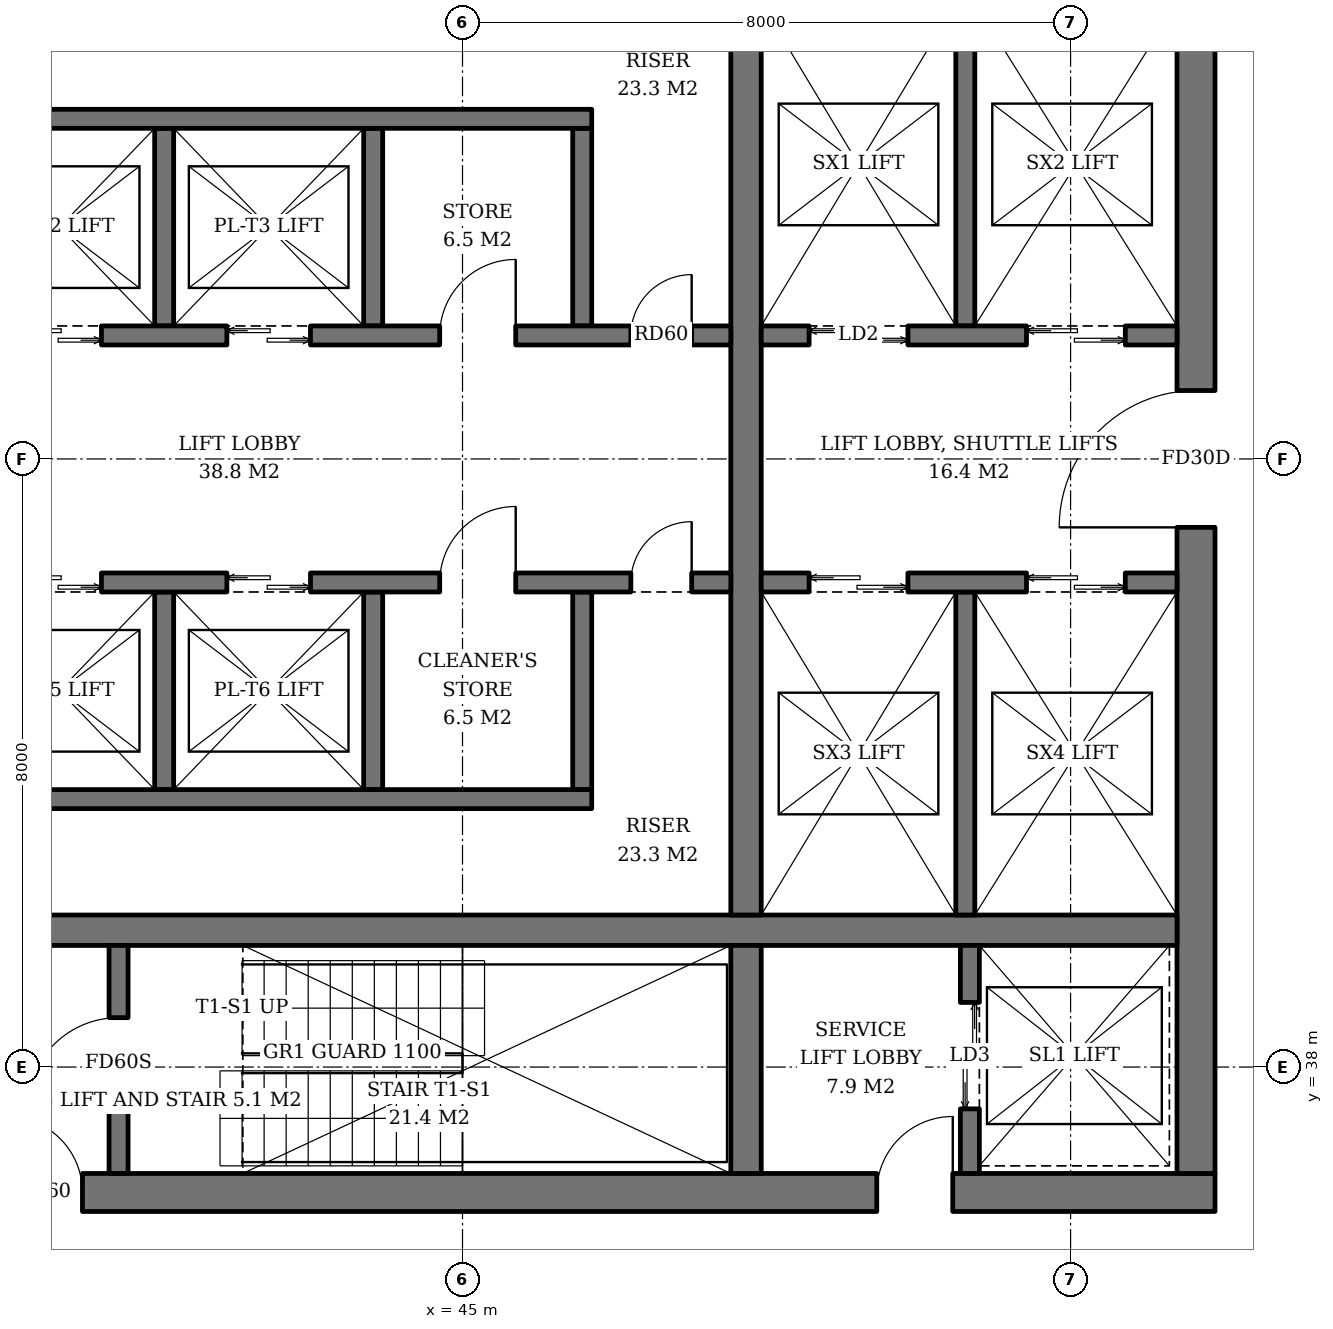
"""IFC4 building model, lengths in metres.
Left out: names, types, materials, properties, quantities, classifications, styles, units other than length and angle.
Written with IfcOpenShell. Run it as: python <this file> out.ifc"""

import sys

from ifc_helpers import new_model, si_unit, direction, frame, frame_2d, origin, place, context, subcontext, project, spatial, rectangle, extrude, element, fill, save


model = new_model("IFC4")
c1 = context("Model", 3, precision=1e-05, world=origin(), true_north=direction((0.0, 1.0)))
c2 = subcontext(c1, "Body", "Model", "MODEL_VIEW")
j1 = project(units=[si_unit("LENGTHUNIT", "METRE"), si_unit("PLANEANGLEUNIT", "RADIAN")], contexts=[c1])
p1 = place(None, origin())
s1 = spatial("IfcSite", under=j1, at=p1, CompositionType="ELEMENT")
p2 = place(p1, origin())
s2 = spatial("IfcBuilding", under=s1, at=p2, CompositionType="ELEMENT")
p3 = place(p2, frame((0.0, 0.0, 237.6)))
s3 = spatial("IfcBuildingStorey", under=s2, at=p3, CompositionType="ELEMENT", Elevation=237.6)
p4 = place(p3, frame((35.1, 36.35, 0.0), z_axis=(0.0, 0.0, 1.0), x_axis=(1.0, 0.0, 0.0)))
e1 = element("IfcWall", 1, at=p4, inside=s3, PredefinedType="SHEAR", context=c2, shape_type="SweptSolid", body=[
    extrude(rectangle(XDim=19.8, YDim=0.5, at=frame_2d((9.9, 0.0))), origin(), (0.0, 0.0, 1.0), 3.8),
])
p5 = place(p4, frame((3.9, 0.0, 0.0)))
e2 = element("IfcOpeningElement", 2, at=p5, cuts=e1, PredefinedType="OPENING", context=c2, shape_type="SweptSolid", body=[
    extrude(rectangle(XDim=1.0, YDim=2.1, at=frame_2d((0.5, 1.05))), frame((0.0, 0.26, 0.0), z_axis=(0.0, -1.0, 0.0), x_axis=(1.0, 0.0, 0.0)), (0.0, 0.0, 1.0), 0.52),
])
p6 = place(p4, frame((15.35, 0.0, 0.0)))
e3 = element("IfcOpeningElement", 3, at=p6, cuts=e1, PredefinedType="OPENING", context=c2, shape_type="SweptSolid", body=[
    extrude(rectangle(XDim=1.0, YDim=2.1, at=frame_2d((0.5, 1.05))), frame((0.0, 0.26, 0.0), z_axis=(0.0, -1.0, 0.0), x_axis=(1.0, 0.0, 0.0)), (0.0, 0.0, 1.0), 0.52),
])
p7 = place(p3, frame((54.65, 36.6, 0.0), z_axis=(0.0, 0.0, 1.0), x_axis=(0.0, 1.0, 0.0)))
e4 = element("IfcWall", 4, at=p7, inside=s3, PredefinedType="SHEAR", context=c2, shape_type="SweptSolid", body=[
    extrude(rectangle(XDim=18.8, YDim=0.5, at=frame_2d((9.4, 0.0))), origin(), (0.0, 0.0, 1.0), 3.8),
])
p8 = place(p7, frame((8.5, 0.0, 0.0)))
e5 = element("IfcOpeningElement", 5, at=p8, cuts=e4, PredefinedType="OPENING", context=c2, shape_type="SweptSolid", body=[
    extrude(rectangle(XDim=1.8, YDim=2.4, at=frame_2d((0.9, 1.2))), frame((0.0, 0.26, 0.0), z_axis=(0.0, -1.0, 0.0), x_axis=(1.0, 0.0, 0.0)), (0.0, 0.0, 1.0), 0.52),
])
p9 = place(p3, frame((35.6, 39.8, 0.0), z_axis=(0.0, 0.0, 1.0), x_axis=(1.0, 0.0, 0.0)))
e6 = element("IfcWall", 6, at=p9, inside=s3, PredefinedType="SHEAR", context=c2, shape_type="SweptSolid", body=[
    extrude(rectangle(XDim=18.8, YDim=0.4, at=frame_2d((9.4, 0.0))), origin(), (0.0, 0.0, 1.0), 3.8),
])
p10 = place(p3, frame((48.73, 36.6, 0.0), z_axis=(0.0, 0.0, 1.0), x_axis=(0.0, 1.0, 0.0)))
e7 = element("IfcWall", 7, at=p10, inside=s3, PredefinedType="SHEAR", context=c2, shape_type="SweptSolid", body=[
    extrude(rectangle(XDim=3.0, YDim=0.4, at=frame_2d((1.5, 0.0))), origin(), (0.0, 0.0, 1.0), 3.8),
])
p11 = place(p3, frame((48.73, 40.0, 0.0), z_axis=(0.0, 0.0, 1.0), x_axis=(0.0, 1.0, 0.0)))
e8 = element("IfcWall", 8, at=p11, inside=s3, PredefinedType="SHEAR", context=c2, shape_type="SweptSolid", body=[
    extrude(rectangle(XDim=12.0, YDim=0.4, at=frame_2d((6.0, 0.0))), origin(), (0.0, 0.0, 1.0), 3.8),
])
p12 = place(p3, frame((40.475, 36.6, 0.0), z_axis=(0.0, 0.0, 1.0), x_axis=(0.0, 1.0, 0.0)))
e9 = element("IfcWall", 9, at=p12, inside=s3, PredefinedType="SHEAR", context=c2, shape_type="SweptSolid", body=[
    extrude(rectangle(XDim=3.0, YDim=0.25, at=frame_2d((1.5, 0.0))), origin(), (0.0, 0.0, 1.0), 3.8),
])
p13 = place(p12, frame((0.85, 0.0, 0.0)))
e10 = element("IfcOpeningElement", 10, at=p13, cuts=e9, PredefinedType="OPENING", context=c2, shape_type="SweptSolid", body=[
    extrude(rectangle(XDim=1.2, YDim=2.1, at=frame_2d((0.6, 1.05))), frame((0.0, 0.135, 0.0), z_axis=(0.0, -1.0, 0.0), x_axis=(1.0, 0.0, 0.0)), (0.0, 0.0, 1.0), 0.27),
])
p14 = place(p3, frame((51.675, 36.6, 0.0), z_axis=(0.0, 0.0, 1.0), x_axis=(0.0, 1.0, 0.0)))
e11 = element("IfcWall", 11, at=p14, inside=s3, PredefinedType="SHEAR", context=c2, shape_type="SweptSolid", body=[
    extrude(rectangle(XDim=3.0, YDim=0.25, at=frame_2d((1.5, 0.0))), origin(), (0.0, 0.0, 1.0), 3.8),
])
p15 = place(p14, frame((0.85, 0.0, 0.0)))
e12 = element("IfcOpeningElement", 12, at=p15, cuts=e11, PredefinedType="OPENING", context=c2, shape_type="SweptSolid", body=[
    extrude(rectangle(XDim=1.4, YDim=2.4, at=frame_2d((0.7, 1.2))), frame((0.0, 0.135, 0.0), z_axis=(0.0, -1.0, 0.0), x_axis=(1.0, 0.0, 0.0)), (0.0, 0.0, 1.0), 0.27),
])
for number, where, z_axis, x_axis in (
    (13, (41.075, 47.75, 0.0), (0.0, 0.0, 1.0), (0.0, 1.0, 0.0)),
    (14, (43.825, 47.75, 0.0), (0.0, 0.0, 1.0), (0.0, 1.0, 0.0)),
    (15, (46.575, 47.75, 0.0), (0.0, 0.0, 1.0), (0.0, 1.0, 0.0)),
):
    element("IfcWall", number, at=place(p3, frame(where, z_axis=z_axis, x_axis=x_axis)), inside=s3, PredefinedType="SHEAR", context=c2, shape_type="SweptSolid", body=[
        extrude(rectangle(XDim=2.6, YDim=0.25, at=frame_2d((1.3, 0.0))), origin(), (0.0, 0.0, 1.0), 3.8),
    ])
p16 = place(p3, frame((35.6, 50.475, 0.0), z_axis=(0.0, 0.0, 1.0), x_axis=(1.0, 0.0, 0.0)))
e16 = element("IfcWall", 16, at=p16, inside=s3, PredefinedType="SHEAR", context=c2, shape_type="SweptSolid", body=[
    extrude(rectangle(XDim=11.1, YDim=0.25, at=frame_2d((5.55, 0.0))), origin(), (0.0, 0.0, 1.0), 3.8),
])
p17 = place(p3, frame((35.6, 47.625, 0.0), z_axis=(0.0, 0.0, 1.0), x_axis=(1.0, 0.0, 0.0)))
e17 = element("IfcWall", 17, at=p17, inside=s3, PredefinedType="SHEAR", context=c2, shape_type="SweptSolid", body=[
    extrude(rectangle(XDim=12.93, YDim=0.25, at=frame_2d((6.465, 0.0))), origin(), (0.0, 0.0, 1.0), 3.8),
])
p18 = place(p17, frame((0.75, 0.0, 0.0)))
e18 = element("IfcOpeningElement", 18, at=p18, cuts=e17, PredefinedType="OPENING", context=c2, shape_type="SweptSolid", body=[
    extrude(rectangle(XDim=1.1, YDim=2.2, at=frame_2d((0.55, 1.1))), frame((0.0, 0.135, 0.0), z_axis=(0.0, -1.0, 0.0), x_axis=(1.0, 0.0, 0.0)), (0.0, 0.0, 1.0), 0.27),
])
p19 = place(p17, frame((3.55, 0.0, 0.0)))
e19 = element("IfcOpeningElement", 19, at=p19, cuts=e17, PredefinedType="OPENING", context=c2, shape_type="SweptSolid", body=[
    extrude(rectangle(XDim=1.1, YDim=2.2, at=frame_2d((0.55, 1.1))), frame((0.0, 0.135, 0.0), z_axis=(0.0, -1.0, 0.0), x_axis=(1.0, 0.0, 0.0)), (0.0, 0.0, 1.0), 0.27),
])
p20 = place(p17, frame((6.3, 0.0, 0.0)))
e20 = element("IfcOpeningElement", 20, at=p20, cuts=e17, PredefinedType="OPENING", context=c2, shape_type="SweptSolid", body=[
    extrude(rectangle(XDim=1.1, YDim=2.2, at=frame_2d((0.55, 1.1))), frame((0.0, 0.135, 0.0), z_axis=(0.0, -1.0, 0.0), x_axis=(1.0, 0.0, 0.0)), (0.0, 0.0, 1.0), 0.27),
])
p21 = place(p17, frame((9.1, 0.0, 0.0)))
e21 = element("IfcOpeningElement", 21, at=p21, cuts=e17, PredefinedType="OPENING", context=c2, shape_type="SweptSolid", body=[
    extrude(rectangle(XDim=1.0, YDim=2.1, at=frame_2d((0.5, 1.05))), frame((0.0, 0.135, 0.0), z_axis=(0.0, -1.0, 0.0), x_axis=(1.0, 0.0, 0.0)), (0.0, 0.0, 1.0), 0.27),
])
p22 = place(p17, frame((11.615, 0.0, 0.0)))
e22 = element("IfcOpeningElement", 22, at=p22, cuts=e17, PredefinedType="OPENING", context=c2, shape_type="SweptSolid", body=[
    extrude(rectangle(XDim=0.8, YDim=2.0, at=frame_2d((0.4, 1.0))), frame((0.0, 0.135, 0.0), z_axis=(0.0, -1.0, 0.0), x_axis=(1.0, 0.0, 0.0)), (0.0, 0.0, 1.0), 0.27),
])
for number, where, z_axis, x_axis in (
    (23, (41.075, 44.25, 0.0), (0.0, 0.0, 1.0), (0.0, -1.0, 0.0)),
    (24, (43.825, 44.25, 0.0), (0.0, 0.0, 1.0), (0.0, -1.0, 0.0)),
    (25, (46.575, 44.25, 0.0), (0.0, 0.0, 1.0), (0.0, -1.0, 0.0)),
):
    element("IfcWall", number, at=place(p3, frame(where, z_axis=z_axis, x_axis=x_axis)), inside=s3, PredefinedType="SHEAR", context=c2, shape_type="SweptSolid", body=[
        extrude(rectangle(XDim=2.6, YDim=0.25, at=frame_2d((1.3, 0.0))), origin(), (0.0, 0.0, 1.0), 3.8),
    ])
p23 = place(p3, frame((35.6, 41.525, 0.0), z_axis=(0.0, 0.0, 1.0), x_axis=(1.0, 0.0, 0.0)))
e26 = element("IfcWall", 26, at=p23, inside=s3, PredefinedType="SHEAR", context=c2, shape_type="SweptSolid", body=[
    extrude(rectangle(XDim=11.1, YDim=0.25, at=frame_2d((5.55, 0.0))), origin(), (0.0, 0.0, 1.0), 3.8),
])
p24 = place(p3, frame((35.6, 44.375, 0.0), z_axis=(0.0, 0.0, 1.0), x_axis=(1.0, 0.0, 0.0)))
e27 = element("IfcWall", 27, at=p24, inside=s3, PredefinedType="SHEAR", context=c2, shape_type="SweptSolid", body=[
    extrude(rectangle(XDim=12.93, YDim=0.25, at=frame_2d((6.465, 0.0))), origin(), (0.0, 0.0, 1.0), 3.8),
])
p25 = place(p24, frame((0.75, 0.0, 0.0)))
e28 = element("IfcOpeningElement", 28, at=p25, cuts=e27, PredefinedType="OPENING", context=c2, shape_type="SweptSolid", body=[
    extrude(rectangle(XDim=1.1, YDim=2.2, at=frame_2d((0.55, 1.1))), frame((0.0, 0.135, 0.0), z_axis=(0.0, -1.0, 0.0), x_axis=(1.0, 0.0, 0.0)), (0.0, 0.0, 1.0), 0.27),
])
p26 = place(p24, frame((3.55, 0.0, 0.0)))
e29 = element("IfcOpeningElement", 29, at=p26, cuts=e27, PredefinedType="OPENING", context=c2, shape_type="SweptSolid", body=[
    extrude(rectangle(XDim=1.1, YDim=2.2, at=frame_2d((0.55, 1.1))), frame((0.0, 0.135, 0.0), z_axis=(0.0, -1.0, 0.0), x_axis=(1.0, 0.0, 0.0)), (0.0, 0.0, 1.0), 0.27),
])
p27 = place(p24, frame((6.3, 0.0, 0.0)))
e30 = element("IfcOpeningElement", 30, at=p27, cuts=e27, PredefinedType="OPENING", context=c2, shape_type="SweptSolid", body=[
    extrude(rectangle(XDim=1.1, YDim=2.2, at=frame_2d((0.55, 1.1))), frame((0.0, 0.135, 0.0), z_axis=(0.0, -1.0, 0.0), x_axis=(1.0, 0.0, 0.0)), (0.0, 0.0, 1.0), 0.27),
])
p28 = place(p24, frame((9.1, 0.0, 0.0)))
e31 = element("IfcOpeningElement", 31, at=p28, cuts=e27, PredefinedType="OPENING", context=c2, shape_type="SweptSolid", body=[
    extrude(rectangle(XDim=1.0, YDim=2.1, at=frame_2d((0.5, 1.05))), frame((0.0, 0.135, 0.0), z_axis=(0.0, -1.0, 0.0), x_axis=(1.0, 0.0, 0.0)), (0.0, 0.0, 1.0), 0.27),
])
p29 = place(p24, frame((11.615, 0.0, 0.0)))
e32 = element("IfcOpeningElement", 32, at=p29, cuts=e27, PredefinedType="OPENING", context=c2, shape_type="SweptSolid", body=[
    extrude(rectangle(XDim=0.8, YDim=2.0, at=frame_2d((0.4, 1.0))), frame((0.0, 0.135, 0.0), z_axis=(0.0, -1.0, 0.0), x_axis=(1.0, 0.0, 0.0)), (0.0, 0.0, 1.0), 0.27),
])
p30 = place(p3, frame((51.615, 47.75, 0.0), z_axis=(0.0, 0.0, 1.0), x_axis=(0.0, 1.0, 0.0)))
e33 = element("IfcWall", 33, at=p30, inside=s3, PredefinedType="SHEAR", context=c2, shape_type="SweptSolid", body=[
    extrude(rectangle(XDim=4.25, YDim=0.25, at=frame_2d((2.125, 0.0))), origin(), (0.0, 0.0, 1.0), 3.8),
])
p31 = place(p3, frame((48.93, 47.625, 0.0), z_axis=(0.0, 0.0, 1.0), x_axis=(1.0, 0.0, 0.0)))
e34 = element("IfcWall", 34, at=p31, inside=s3, PredefinedType="SHEAR", context=c2, shape_type="SweptSolid", body=[
    extrude(rectangle(XDim=5.47, YDim=0.25, at=frame_2d((2.735, 0.0))), origin(), (0.0, 0.0, 1.0), 3.8),
])
p32 = place(p31, frame((0.63, 0.0, 0.0)))
e35 = element("IfcOpeningElement", 35, at=p32, cuts=e34, PredefinedType="OPENING", context=c2, shape_type="SweptSolid", body=[
    extrude(rectangle(XDim=1.3, YDim=2.2, at=frame_2d((0.65, 1.1))), frame((0.0, 0.135, 0.0), z_axis=(0.0, -1.0, 0.0), x_axis=(1.0, 0.0, 0.0)), (0.0, 0.0, 1.0), 0.27),
])
p33 = place(p31, frame((3.49, 0.0, 0.0)))
e36 = element("IfcOpeningElement", 36, at=p33, cuts=e34, PredefinedType="OPENING", context=c2, shape_type="SweptSolid", body=[
    extrude(rectangle(XDim=1.3, YDim=2.2, at=frame_2d((0.65, 1.1))), frame((0.0, 0.135, 0.0), z_axis=(0.0, -1.0, 0.0), x_axis=(1.0, 0.0, 0.0)), (0.0, 0.0, 1.0), 0.27),
])
p34 = place(p3, frame((51.615, 44.25, 0.0), z_axis=(0.0, 0.0, 1.0), x_axis=(0.0, -1.0, 0.0)))
e37 = element("IfcWall", 37, at=p34, inside=s3, PredefinedType="SHEAR", context=c2, shape_type="SweptSolid", body=[
    extrude(rectangle(XDim=4.25, YDim=0.25, at=frame_2d((2.125, 0.0))), origin(), (0.0, 0.0, 1.0), 3.8),
])
p35 = place(p3, frame((48.93, 44.375, 0.0), z_axis=(0.0, 0.0, 1.0), x_axis=(1.0, 0.0, 0.0)))
e38 = element("IfcWall", 38, at=p35, inside=s3, PredefinedType="SHEAR", context=c2, shape_type="SweptSolid", body=[
    extrude(rectangle(XDim=5.47, YDim=0.25, at=frame_2d((2.735, 0.0))), origin(), (0.0, 0.0, 1.0), 3.8),
])
p36 = place(p35, frame((0.63, 0.0, 0.0)))
e39 = element("IfcOpeningElement", 39, at=p36, cuts=e38, PredefinedType="OPENING", context=c2, shape_type="SweptSolid", body=[
    extrude(rectangle(XDim=1.3, YDim=2.2, at=frame_2d((0.65, 1.1))), frame((0.0, 0.135, 0.0), z_axis=(0.0, -1.0, 0.0), x_axis=(1.0, 0.0, 0.0)), (0.0, 0.0, 1.0), 0.27),
])
p37 = place(p35, frame((3.49, 0.0, 0.0)))
e40 = element("IfcOpeningElement", 40, at=p37, cuts=e38, PredefinedType="OPENING", context=c2, shape_type="SweptSolid", body=[
    extrude(rectangle(XDim=1.3, YDim=2.2, at=frame_2d((0.65, 1.1))), frame((0.0, 0.135, 0.0), z_axis=(0.0, -1.0, 0.0), x_axis=(1.0, 0.0, 0.0)), (0.0, 0.0, 1.0), 0.27),
])
p38 = place(p13, origin())
e41 = element("IfcDoor", 41, at=p38, inside=s3, OperationType="SINGLE_SWING_LEFT", PredefinedType="DOOR", context=c2, shape_type="SweptSolid", body=[
    extrude(rectangle(XDim=1.2, YDim=2.1, at=frame_2d((0.6, 1.05))), frame((0.0, 0.025, 0.0), z_axis=(0.0, -1.0, 0.0), x_axis=(1.0, 0.0, 0.0)), (0.0, 0.0, 1.0), 0.05),
])
fill(e10, e41)
p39 = place(p15, origin())
e42 = element("IfcDoor", 42, at=p39, inside=s3, OperationType="DOUBLE_DOOR_SLIDING", PredefinedType="DOOR", context=c2, shape_type="SweptSolid", body=[
    extrude(rectangle(XDim=1.4, YDim=2.4, at=frame_2d((0.7, 1.2))), frame((0.0, 0.025, 0.0), z_axis=(0.0, -1.0, 0.0), x_axis=(1.0, 0.0, 0.0)), (0.0, 0.0, 1.0), 0.05),
])
fill(e12, e42)
p40 = place(p19, origin())
e43 = element("IfcDoor", 43, at=p40, inside=s3, OperationType="DOUBLE_DOOR_SLIDING", PredefinedType="DOOR", context=c2, shape_type="SweptSolid", body=[
    extrude(rectangle(XDim=1.1, YDim=2.2, at=frame_2d((0.55, 1.1))), frame((0.0, 0.025, 0.0), z_axis=(0.0, -1.0, 0.0), x_axis=(1.0, 0.0, 0.0)), (0.0, 0.0, 1.0), 0.05),
])
fill(e19, e43)
p41 = place(p20, origin())
e44 = element("IfcDoor", 44, at=p41, inside=s3, OperationType="DOUBLE_DOOR_SLIDING", PredefinedType="DOOR", context=c2, shape_type="SweptSolid", body=[
    extrude(rectangle(XDim=1.1, YDim=2.2, at=frame_2d((0.55, 1.1))), frame((0.0, 0.025, 0.0), z_axis=(0.0, -1.0, 0.0), x_axis=(1.0, 0.0, 0.0)), (0.0, 0.0, 1.0), 0.05),
])
fill(e20, e44)
p42 = place(p21, origin())
e45 = element("IfcDoor", 45, at=p42, inside=s3, OperationType="SINGLE_SWING_RIGHT", PredefinedType="DOOR", context=c2, shape_type="SweptSolid", body=[
    extrude(rectangle(XDim=1.0, YDim=2.1, at=frame_2d((0.5, 1.05))), frame((0.0, 0.025, 0.0), z_axis=(0.0, -1.0, 0.0), x_axis=(1.0, 0.0, 0.0)), (0.0, 0.0, 1.0), 0.05),
])
fill(e21, e45)
p43 = place(p22, origin())
e46 = element("IfcDoor", 46, at=p43, inside=s3, OperationType="SINGLE_SWING_RIGHT", PredefinedType="DOOR", context=c2, shape_type="SweptSolid", body=[
    extrude(rectangle(XDim=0.8, YDim=2.0, at=frame_2d((0.4, 1.0))), frame((0.0, 0.025, 0.0), z_axis=(0.0, -1.0, 0.0), x_axis=(1.0, 0.0, 0.0)), (0.0, 0.0, 1.0), 0.05),
])
fill(e22, e46)
p44 = place(p26, origin())
e47 = element("IfcDoor", 47, at=p44, inside=s3, OperationType="DOUBLE_DOOR_SLIDING", PredefinedType="DOOR", context=c2, shape_type="SweptSolid", body=[
    extrude(rectangle(XDim=1.1, YDim=2.2, at=frame_2d((0.55, 1.1))), frame((0.0, 0.025, 0.0), z_axis=(0.0, -1.0, 0.0), x_axis=(1.0, 0.0, 0.0)), (0.0, 0.0, 1.0), 0.05),
])
fill(e29, e47)
p45 = place(p27, origin())
e48 = element("IfcDoor", 48, at=p45, inside=s3, OperationType="DOUBLE_DOOR_SLIDING", PredefinedType="DOOR", context=c2, shape_type="SweptSolid", body=[
    extrude(rectangle(XDim=1.1, YDim=2.2, at=frame_2d((0.55, 1.1))), frame((0.0, 0.025, 0.0), z_axis=(0.0, -1.0, 0.0), x_axis=(1.0, 0.0, 0.0)), (0.0, 0.0, 1.0), 0.05),
])
fill(e30, e48)
p46 = place(p28, origin())
e49 = element("IfcDoor", 49, at=p46, inside=s3, OperationType="SINGLE_SWING_RIGHT", PredefinedType="DOOR", context=c2, shape_type="SweptSolid", body=[
    extrude(rectangle(XDim=1.0, YDim=2.1, at=frame_2d((0.5, 1.05))), frame((0.0, 0.025, 0.0), z_axis=(0.0, -1.0, 0.0), x_axis=(1.0, 0.0, 0.0)), (0.0, 0.0, 1.0), 0.05),
])
fill(e31, e49)
p47 = place(p29, origin())
e50 = element("IfcDoor", 50, at=p47, inside=s3, OperationType="SINGLE_SWING_RIGHT", PredefinedType="DOOR", context=c2, shape_type="SweptSolid", body=[
    extrude(rectangle(XDim=0.8, YDim=2.0, at=frame_2d((0.4, 1.0))), frame((0.0, 0.025, 0.0), z_axis=(0.0, -1.0, 0.0), x_axis=(1.0, 0.0, 0.0)), (0.0, 0.0, 1.0), 0.05),
])
fill(e32, e50)
p48 = place(p32, origin())
e51 = element("IfcDoor", 51, at=p48, inside=s3, OperationType="DOUBLE_DOOR_SLIDING", PredefinedType="DOOR", context=c2, shape_type="SweptSolid", body=[
    extrude(rectangle(XDim=1.3, YDim=2.2, at=frame_2d((0.65, 1.1))), frame((0.0, 0.025, 0.0), z_axis=(0.0, -1.0, 0.0), x_axis=(1.0, 0.0, 0.0)), (0.0, 0.0, 1.0), 0.05),
])
fill(e35, e51)
p49 = place(p33, origin())
e52 = element("IfcDoor", 52, at=p49, inside=s3, OperationType="DOUBLE_DOOR_SLIDING", PredefinedType="DOOR", context=c2, shape_type="SweptSolid", body=[
    extrude(rectangle(XDim=1.3, YDim=2.2, at=frame_2d((0.65, 1.1))), frame((0.0, 0.025, 0.0), z_axis=(0.0, -1.0, 0.0), x_axis=(1.0, 0.0, 0.0)), (0.0, 0.0, 1.0), 0.05),
])
fill(e36, e52)
p50 = place(p36, origin())
e53 = element("IfcDoor", 53, at=p50, inside=s3, OperationType="DOUBLE_DOOR_SLIDING", PredefinedType="DOOR", context=c2, shape_type="SweptSolid", body=[
    extrude(rectangle(XDim=1.3, YDim=2.2, at=frame_2d((0.65, 1.1))), frame((0.0, 0.025, 0.0), z_axis=(0.0, -1.0, 0.0), x_axis=(1.0, 0.0, 0.0)), (0.0, 0.0, 1.0), 0.05),
])
fill(e39, e53)
p51 = place(p37, origin())
e54 = element("IfcDoor", 54, at=p51, inside=s3, OperationType="DOUBLE_DOOR_SLIDING", PredefinedType="DOOR", context=c2, shape_type="SweptSolid", body=[
    extrude(rectangle(XDim=1.3, YDim=2.2, at=frame_2d((0.65, 1.1))), frame((0.0, 0.025, 0.0), z_axis=(0.0, -1.0, 0.0), x_axis=(1.0, 0.0, 0.0)), (0.0, 0.0, 1.0), 0.05),
])
fill(e40, e54)
p52 = place(p5, origin())
e55 = element("IfcDoor", 55, at=p52, inside=s3, OperationType="SINGLE_SWING_LEFT", PredefinedType="DOOR", context=c2, shape_type="SweptSolid", body=[
    extrude(rectangle(XDim=1.0, YDim=2.1, at=frame_2d((0.5, 1.05))), frame((0.0, 0.025, 0.0), z_axis=(0.0, -1.0, 0.0), x_axis=(1.0, 0.0, 0.0)), (0.0, 0.0, 1.0), 0.05),
])
fill(e2, e55)
p53 = place(p8, origin())
e56 = element("IfcDoor", 56, at=p53, inside=s3, OperationType="DOUBLE_DOOR_SINGLE_SWING", PredefinedType="DOOR", context=c2, shape_type="SweptSolid", body=[
    extrude(rectangle(XDim=1.8, YDim=2.4, at=frame_2d((0.9, 1.2))), frame((0.0, 0.025, 0.0), z_axis=(0.0, -1.0, 0.0), x_axis=(1.0, 0.0, 0.0)), (0.0, 0.0, 1.0), 0.05),
])
fill(e5, e56)
p54 = place(p6, origin())
e57 = element("IfcDoor", 57, at=p54, inside=s3, OperationType="SINGLE_SWING_RIGHT", PredefinedType="DOOR", context=c2, shape_type="SweptSolid", body=[
    extrude(rectangle(XDim=1.0, YDim=2.1, at=frame_2d((0.5, 1.05))), frame((0.0, 0.025, 0.0), z_axis=(0.0, -1.0, 0.0), x_axis=(1.0, 0.0, 0.0)), (0.0, 0.0, 1.0), 0.05),
])
fill(e3, e57)
save(model, sys.argv[1])
